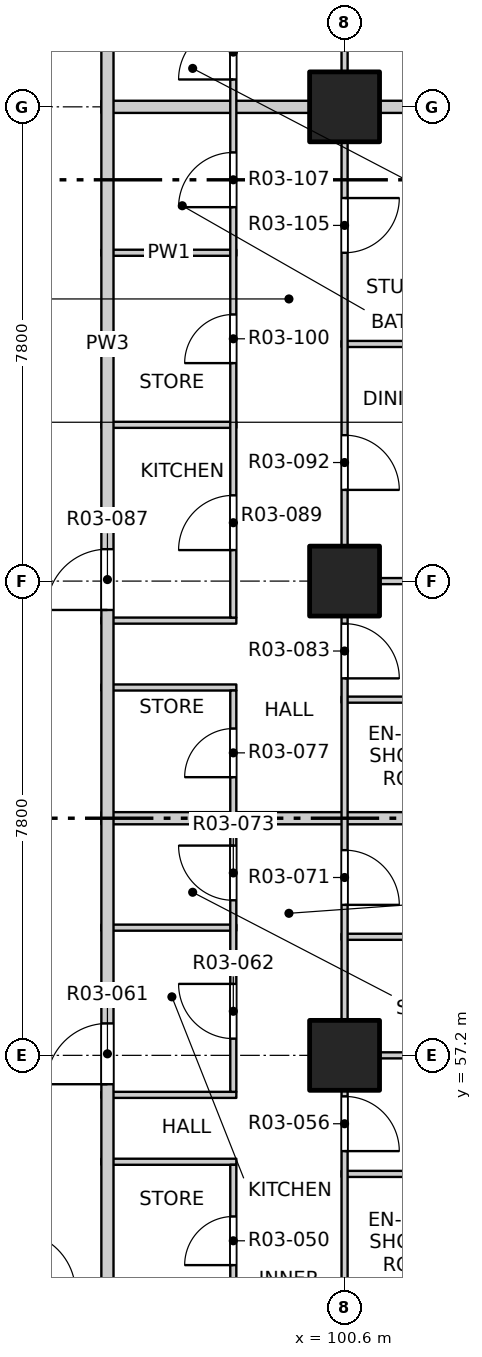
"""IFC4 building model, lengths in metres.
Left out: names, types, materials, properties, quantities, classifications, styles, units other than length and angle.
Written with IfcOpenShell. Run it as: python <this file> out.ifc"""

import sys

from ifc_helpers import new_model, si_unit, direction, frame, frame_2d, origin, origin_2d, place, context, subcontext, project, spatial, rectangle, extrude, element, fill, save


model = new_model("IFC4")
c1 = context("Model", 3, precision=1e-05, world=origin(), true_north=direction((0.0, 1.0)))
c2 = subcontext(c1, "Body", "Model", "MODEL_VIEW")
j1 = project(units=[si_unit("LENGTHUNIT", "METRE"), si_unit("PLANEANGLEUNIT", "RADIAN")], contexts=[c1])
p1 = place(None, origin())
s1 = spatial("IfcSite", under=j1, at=p1, CompositionType="ELEMENT")
p2 = place(p1, origin())
s2 = spatial("IfcBuilding", under=s1, at=p2, CompositionType="ELEMENT")
p3 = place(p2, frame((0.0, 0.0, 39.9)))
s3 = spatial("IfcBuildingStorey", under=s2, at=p3, CompositionType="ELEMENT", Elevation=39.9)
for number, where, z_axis, x_axis in (
    (1, (100.6, 57.2, -0.25), (0.0, 0.0, 1.0), (1.0, 0.0, 0.0)),
    (2, (100.6, 65.0, -0.25), (0.0, 0.0, 1.0), (1.0, 0.0, 0.0)),
    (3, (100.6, 72.8, -0.25), (0.0, 0.0, 1.0), (1.0, 0.0, 0.0)),
):
    element("IfcColumn", number, at=place(p3, frame(where, z_axis=z_axis, x_axis=x_axis)), inside=s3, PredefinedType="COLUMN", context=c2, shape_type="SweptSolid", body=[
        extrude(rectangle(XDim=1.15, YDim=1.15, at=origin_2d()), origin(), (0.0, 0.0, 1.0), 3.4),
    ])
p4 = place(p3, frame((100.55, 55.25, 0.0), z_axis=(0.0, 0.0, 1.0), x_axis=(1.0, 0.0, 0.0)))
e4 = element("IfcWall", 4, at=p4, inside=s3, PredefinedType="PARTITIONING", context=c2, shape_type="SweptSolid", body=[
    extrude(rectangle(XDim=3.55, YDim=0.1, at=frame_2d((1.775, 0.0))), origin(), (0.0, 0.0, 1.0), 3.15),
])
for number, where, z_axis, x_axis in (
    (5, (96.6, 55.45, 0.0), (0.0, 0.0, 1.0), (1.0, 0.0, 0.0)),
    (6, (96.6, 56.55, 0.0), (0.0, 0.0, 1.0), (1.0, 0.0, 0.0)),
):
    element("IfcWall", number, at=place(p3, frame(where, z_axis=z_axis, x_axis=x_axis)), inside=s3, PredefinedType="PARTITIONING", context=c2, shape_type="SweptSolid", body=[
        extrude(rectangle(XDim=2.22, YDim=0.1, at=frame_2d((1.11, 0.0))), origin(), (0.0, 0.0, 1.0), 3.15),
    ])
p5 = place(p3, frame((100.55, 57.2, 0.0), z_axis=(0.0, 0.0, 1.0), x_axis=(1.0, 0.0, 0.0)))
e7 = element("IfcWall", 7, at=p5, inside=s3, PredefinedType="PARTITIONING", context=c2, shape_type="SweptSolid", body=[
    extrude(rectangle(XDim=7.55, YDim=0.1, at=frame_2d((3.775, 0.0))), origin(), (0.0, 0.0, 1.0), 2.55),
])
p6 = place(p3, frame((100.55, 59.15, 0.0), z_axis=(0.0, 0.0, 1.0), x_axis=(1.0, 0.0, 0.0)))
e8 = element("IfcWall", 8, at=p6, inside=s3, PredefinedType="PARTITIONING", context=c2, shape_type="SweptSolid", body=[
    extrude(rectangle(XDim=3.55, YDim=0.1, at=frame_2d((1.775, 0.0))), origin(), (0.0, 0.0, 1.0), 3.15),
])
p7 = place(p3, frame((96.6, 59.3, 0.0), z_axis=(0.0, 0.0, 1.0), x_axis=(1.0, 0.0, 0.0)))
e9 = element("IfcWall", 9, at=p7, inside=s3, PredefinedType="PARTITIONING", context=c2, shape_type="SweptSolid", body=[
    extrude(rectangle(XDim=2.22, YDim=0.1, at=frame_2d((1.11, 0.0))), origin(), (0.0, 0.0, 1.0), 3.15),
])
p8 = place(p3, frame((96.6, 61.1, 0.0), z_axis=(0.0, 0.0, 1.0), x_axis=(1.0, 0.0, 0.0)))
e10 = element("IfcWall", 10, at=p8, inside=s3, PredefinedType="PARTITIONING", context=c2, shape_type="SweptSolid", body=[
    extrude(rectangle(XDim=11.5, YDim=0.2, at=frame_2d((5.75, 0.0))), origin(), (0.0, 0.0, 1.0), 3.15),
])
p9 = place(p3, frame((100.55, 63.05, 0.0), z_axis=(0.0, 0.0, 1.0), x_axis=(1.0, 0.0, 0.0)))
e11 = element("IfcWall", 11, at=p9, inside=s3, PredefinedType="PARTITIONING", context=c2, shape_type="SweptSolid", body=[
    extrude(rectangle(XDim=3.55, YDim=0.1, at=frame_2d((1.775, 0.0))), origin(), (0.0, 0.0, 1.0), 3.15),
])
for number, where, z_axis, x_axis in (
    (12, (96.6, 63.25, 0.0), (0.0, 0.0, 1.0), (1.0, 0.0, 0.0)),
    (13, (96.6, 64.35, 0.0), (0.0, 0.0, 1.0), (1.0, 0.0, 0.0)),
):
    element("IfcWall", number, at=place(p3, frame(where, z_axis=z_axis, x_axis=x_axis)), inside=s3, PredefinedType="PARTITIONING", context=c2, shape_type="SweptSolid", body=[
        extrude(rectangle(XDim=2.22, YDim=0.1, at=frame_2d((1.11, 0.0))), origin(), (0.0, 0.0, 1.0), 3.15),
    ])
p10 = place(p3, frame((100.55, 65.0, 0.0), z_axis=(0.0, 0.0, 1.0), x_axis=(1.0, 0.0, 0.0)))
e14 = element("IfcWall", 14, at=p10, inside=s3, PredefinedType="PARTITIONING", context=c2, shape_type="SweptSolid", body=[
    extrude(rectangle(XDim=7.55, YDim=0.1, at=frame_2d((3.775, 0.0))), origin(), (0.0, 0.0, 1.0), 2.55),
])
p11 = place(p3, frame((96.6, 67.57, 0.0), z_axis=(0.0, 0.0, 1.0), x_axis=(1.0, 0.0, 0.0)))
e15 = element("IfcWall", 15, at=p11, inside=s3, PredefinedType="PARTITIONING", context=c2, shape_type="SweptSolid", body=[
    extrude(rectangle(XDim=2.22, YDim=0.1, at=frame_2d((1.11, 0.0))), origin(), (0.0, 0.0, 1.0), 3.15),
])
p12 = place(p3, frame((100.55, 68.9, 0.0), z_axis=(0.0, 0.0, 1.0), x_axis=(1.0, 0.0, 0.0)))
e16 = element("IfcWall", 16, at=p12, inside=s3, PredefinedType="PARTITIONING", context=c2, shape_type="SweptSolid", body=[
    extrude(rectangle(XDim=7.55, YDim=0.1, at=frame_2d((3.775, 0.0))), origin(), (0.0, 0.0, 1.0), 3.15),
])
p13 = place(p3, frame((96.6, 70.4, 0.0), z_axis=(0.0, 0.0, 1.0), x_axis=(1.0, 0.0, 0.0)))
e17 = element("IfcWall", 17, at=p13, inside=s3, PredefinedType="PARTITIONING", context=c2, shape_type="SweptSolid", body=[
    extrude(rectangle(XDim=2.22, YDim=0.1, at=frame_2d((1.11, 0.0))), origin(), (0.0, 0.0, 1.0), 3.15),
])
p14 = place(p3, frame((96.6, 72.8, 0.0), z_axis=(0.0, 0.0, 1.0), x_axis=(1.0, 0.0, 0.0)))
e18 = element("IfcWall", 18, at=p14, inside=s3, PredefinedType="PARTITIONING", context=c2, shape_type="SweptSolid", body=[
    extrude(rectangle(XDim=4.0, YDim=0.2, at=frame_2d((2.0, 0.0))), origin(), (0.0, 0.0, 1.0), 3.15),
])
p15 = place(p3, frame((100.6, 72.8, 0.0), z_axis=(0.0, 0.0, 1.0), x_axis=(1.0, 0.0, 0.0)))
e19 = element("IfcWall", 19, at=p15, inside=s3, PredefinedType="PARTITIONING", context=c2, shape_type="SweptSolid", body=[
    extrude(rectangle(XDim=7.5, YDim=0.2, at=frame_2d((3.75, 0.0))), origin(), (0.0, 0.0, 1.0), 2.55),
])
p16 = place(p3, frame((96.7, 53.4, 0.0), z_axis=(0.0, 0.0, 1.0), x_axis=(0.0, 1.0, 0.0)))
e20 = element("IfcWall", 20, at=p16, inside=s3, PredefinedType="PARTITIONING", context=c2, shape_type="SweptSolid", body=[
    extrude(rectangle(XDim=31.0, YDim=0.2, at=frame_2d((15.5, 0.0))), origin(), (0.0, 0.0, 1.0), 3.15),
])
p17 = place(p16, frame((3.325, 0.0, 0.0)))
e21 = element("IfcOpeningElement", 21, at=p17, cuts=e20, PredefinedType="OPENING", context=c2, shape_type="SweptSolid", body=[
    extrude(rectangle(XDim=1.0, YDim=2.1, at=frame_2d((0.5, 1.05))), frame((0.0, 0.11, 0.0), z_axis=(0.0, -1.0, 0.0), x_axis=(1.0, 0.0, 0.0)), (0.0, 0.0, 1.0), 0.22),
])
p18 = place(p16, frame((11.125, 0.0, 0.0)))
e22 = element("IfcOpeningElement", 22, at=p18, cuts=e20, PredefinedType="OPENING", context=c2, shape_type="SweptSolid", body=[
    extrude(rectangle(XDim=1.0, YDim=2.1, at=frame_2d((0.5, 1.05))), frame((0.0, 0.11, 0.0), z_axis=(0.0, -1.0, 0.0), x_axis=(1.0, 0.0, 0.0)), (0.0, 0.0, 1.0), 0.22),
])
p19 = place(p16, frame((26.875, 0.0, 0.0)))
e23 = element("IfcOpeningElement", 23, at=p19, cuts=e20, PredefinedType="OPENING", context=c2, shape_type="SweptSolid", body=[
    extrude(rectangle(XDim=1.0, YDim=2.1, at=frame_2d((0.5, 1.05))), frame((0.0, 0.11, 0.0), z_axis=(0.0, -1.0, 0.0), x_axis=(1.0, 0.0, 0.0)), (0.0, 0.0, 1.0), 0.22),
])
p20 = place(p3, frame((98.77, 45.55, 0.0), z_axis=(0.0, 0.0, 1.0), x_axis=(0.0, 1.0, 0.0)))
e24 = element("IfcWall", 24, at=p20, inside=s3, PredefinedType="PARTITIONING", context=c2, shape_type="SweptSolid", body=[
    extrude(rectangle(XDim=9.85, YDim=0.1, at=frame_2d((4.925, 0.0))), origin(), (0.0, 0.0, 1.0), 3.15),
])
p21 = place(p20, frame((0.85, 0.0, 0.0)))
e25 = element("IfcOpeningElement", 25, at=p21, cuts=e24, PredefinedType="OPENING", context=c2, shape_type="SweptSolid", body=[
    extrude(rectangle(XDim=0.8, YDim=2.1, at=frame_2d((0.4, 1.05))), frame((0.0, 0.06, 0.0), z_axis=(0.0, -1.0, 0.0), x_axis=(1.0, 0.0, 0.0)), (0.0, 0.0, 1.0), 0.12),
])
p22 = place(p20, frame((3.3, 0.0, 0.0)))
e26 = element("IfcOpeningElement", 26, at=p22, cuts=e24, PredefinedType="OPENING", context=c2, shape_type="SweptSolid", body=[
    extrude(rectangle(XDim=0.9, YDim=2.1, at=frame_2d((0.45, 1.05))), frame((0.0, 0.06, 0.0), z_axis=(0.0, -1.0, 0.0), x_axis=(1.0, 0.0, 0.0)), (0.0, 0.0, 1.0), 0.12),
])
p23 = place(p20, frame((5.725, 0.0, 0.0)))
e27 = element("IfcOpeningElement", 27, at=p23, cuts=e24, PredefinedType="OPENING", context=c2, shape_type="SweptSolid", body=[
    extrude(rectangle(XDim=0.8, YDim=2.1, at=frame_2d((0.4, 1.05))), frame((0.0, 0.06, 0.0), z_axis=(0.0, -1.0, 0.0), x_axis=(1.0, 0.0, 0.0)), (0.0, 0.0, 1.0), 0.12),
])
p24 = place(p20, frame((8.2, 0.0, 0.0)))
e28 = element("IfcOpeningElement", 28, at=p24, cuts=e24, PredefinedType="OPENING", context=c2, shape_type="SweptSolid", body=[
    extrude(rectangle(XDim=0.8, YDim=2.1, at=frame_2d((0.4, 1.05))), frame((0.0, 0.06, 0.0), z_axis=(0.0, -1.0, 0.0), x_axis=(1.0, 0.0, 0.0)), (0.0, 0.0, 1.0), 0.12),
])
p25 = place(p3, frame((98.77, 56.6, 0.0), z_axis=(0.0, 0.0, 1.0), x_axis=(0.0, 1.0, 0.0)))
e29 = element("IfcWall", 29, at=p25, inside=s3, PredefinedType="PARTITIONING", context=c2, shape_type="SweptSolid", body=[
    extrude(rectangle(XDim=6.6, YDim=0.1, at=frame_2d((3.3, 0.0))), origin(), (0.0, 0.0, 1.0), 3.15),
])
p26 = place(p25, frame((0.875, 0.0, 0.0)))
e30 = element("IfcOpeningElement", 30, at=p26, cuts=e29, PredefinedType="OPENING", context=c2, shape_type="SweptSolid", body=[
    extrude(rectangle(XDim=0.9, YDim=2.1, at=frame_2d((0.45, 1.05))), frame((0.0, 0.06, 0.0), z_axis=(0.0, -1.0, 0.0), x_axis=(1.0, 0.0, 0.0)), (0.0, 0.0, 1.0), 0.12),
])
p27 = place(p25, frame((3.15, 0.0, 0.0)))
e31 = element("IfcOpeningElement", 31, at=p27, cuts=e29, PredefinedType="OPENING", context=c2, shape_type="SweptSolid", body=[
    extrude(rectangle(XDim=0.9, YDim=2.1, at=frame_2d((0.45, 1.05))), frame((0.0, 0.06, 0.0), z_axis=(0.0, -1.0, 0.0), x_axis=(1.0, 0.0, 0.0)), (0.0, 0.0, 1.0), 0.12),
])
p28 = place(p25, frame((5.175, 0.0, 0.0)))
e32 = element("IfcOpeningElement", 32, at=p28, cuts=e29, PredefinedType="OPENING", context=c2, shape_type="SweptSolid", body=[
    extrude(rectangle(XDim=0.8, YDim=2.1, at=frame_2d((0.4, 1.05))), frame((0.0, 0.06, 0.0), z_axis=(0.0, -1.0, 0.0), x_axis=(1.0, 0.0, 0.0)), (0.0, 0.0, 1.0), 0.12),
])
p29 = place(p3, frame((98.77, 64.4, 0.0), z_axis=(0.0, 0.0, 1.0), x_axis=(0.0, 1.0, 0.0)))
e33 = element("IfcWall", 33, at=p29, inside=s3, PredefinedType="PARTITIONING", context=c2, shape_type="SweptSolid", body=[
    extrude(rectangle(XDim=14.55, YDim=0.1, at=frame_2d((7.275, 0.0))), origin(), (0.0, 0.0, 1.0), 3.15),
])
p30 = place(p29, frame((1.11, 0.0, 0.0)))
e34 = element("IfcOpeningElement", 34, at=p30, cuts=e33, PredefinedType="OPENING", context=c2, shape_type="SweptSolid", body=[
    extrude(rectangle(XDim=0.9, YDim=2.1, at=frame_2d((0.45, 1.05))), frame((0.0, 0.06, 0.0), z_axis=(0.0, -1.0, 0.0), x_axis=(1.0, 0.0, 0.0)), (0.0, 0.0, 1.0), 0.12),
])
p31 = place(p29, frame((4.185, 0.0, 0.0)))
e35 = element("IfcOpeningElement", 35, at=p31, cuts=e33, PredefinedType="OPENING", context=c2, shape_type="SweptSolid", body=[
    extrude(rectangle(XDim=0.8, YDim=2.1, at=frame_2d((0.4, 1.05))), frame((0.0, 0.06, 0.0), z_axis=(0.0, -1.0, 0.0), x_axis=(1.0, 0.0, 0.0)), (0.0, 0.0, 1.0), 0.12),
])
p32 = place(p29, frame((6.75, 0.0, 0.0)))
e36 = element("IfcOpeningElement", 36, at=p32, cuts=e33, PredefinedType="OPENING", context=c2, shape_type="SweptSolid", body=[
    extrude(rectangle(XDim=0.9, YDim=2.1, at=frame_2d((0.45, 1.05))), frame((0.0, 0.06, 0.0), z_axis=(0.0, -1.0, 0.0), x_axis=(1.0, 0.0, 0.0)), (0.0, 0.0, 1.0), 0.12),
])
p33 = place(p29, frame((8.85, 0.0, 0.0)))
e37 = element("IfcOpeningElement", 37, at=p33, cuts=e33, PredefinedType="OPENING", context=c2, shape_type="SweptSolid", body=[
    extrude(rectangle(XDim=0.9, YDim=2.1, at=frame_2d((0.45, 1.05))), frame((0.0, 0.06, 0.0), z_axis=(0.0, -1.0, 0.0), x_axis=(1.0, 0.0, 0.0)), (0.0, 0.0, 1.0), 0.12),
])
p34 = place(p29, frame((10.875, 0.0, 0.0)))
e38 = element("IfcOpeningElement", 38, at=p34, cuts=e33, PredefinedType="OPENING", context=c2, shape_type="SweptSolid", body=[
    extrude(rectangle(XDim=0.9, YDim=2.1, at=frame_2d((0.45, 1.05))), frame((0.0, 0.06, 0.0), z_axis=(0.0, -1.0, 0.0), x_axis=(1.0, 0.0, 0.0)), (0.0, 0.0, 1.0), 0.12),
])
p35 = place(p29, frame((13.125, 0.0, 0.0)))
e39 = element("IfcOpeningElement", 39, at=p35, cuts=e33, PredefinedType="OPENING", context=c2, shape_type="SweptSolid", body=[
    extrude(rectangle(XDim=0.8, YDim=2.1, at=frame_2d((0.4, 1.05))), frame((0.0, 0.06, 0.0), z_axis=(0.0, -1.0, 0.0), x_axis=(1.0, 0.0, 0.0)), (0.0, 0.0, 1.0), 0.12),
])
p36 = place(p3, frame((100.6, 49.4, 0.0), z_axis=(0.0, 0.0, 1.0), x_axis=(0.0, 1.0, 0.0)))
e40 = element("IfcWall", 40, at=p36, inside=s3, PredefinedType="PARTITIONING", context=c2, shape_type="SweptSolid", body=[
    extrude(rectangle(XDim=31.2, YDim=0.1, at=frame_2d((15.6, 0.0))), origin(), (0.0, 0.0, 1.0), 3.15),
])
p37 = place(p36, frame((1.5, 0.0, 0.0)))
e41 = element("IfcOpeningElement", 41, at=p37, cuts=e40, PredefinedType="OPENING", context=c2, shape_type="SweptSolid", body=[
    extrude(rectangle(XDim=0.9, YDim=2.1, at=frame_2d((0.45, 1.05))), frame((0.0, 0.06, 0.0), z_axis=(0.0, -1.0, 0.0), x_axis=(1.0, 0.0, 0.0)), (0.0, 0.0, 1.0), 0.12),
])
p38 = place(p36, frame((6.225, 0.0, 0.0)))
e42 = element("IfcOpeningElement", 42, at=p38, cuts=e40, PredefinedType="OPENING", context=c2, shape_type="SweptSolid", body=[
    extrude(rectangle(XDim=0.9, YDim=2.1, at=frame_2d((0.45, 1.05))), frame((0.0, 0.06, 0.0), z_axis=(0.0, -1.0, 0.0), x_axis=(1.0, 0.0, 0.0)), (0.0, 0.0, 1.0), 0.12),
])
p39 = place(p36, frame((10.275, 0.0, 0.0)))
e43 = element("IfcOpeningElement", 43, at=p39, cuts=e40, PredefinedType="OPENING", context=c2, shape_type="SweptSolid", body=[
    extrude(rectangle(XDim=0.9, YDim=2.1, at=frame_2d((0.45, 1.05))), frame((0.0, 0.06, 0.0), z_axis=(0.0, -1.0, 0.0), x_axis=(1.0, 0.0, 0.0)), (0.0, 0.0, 1.0), 0.12),
])
p40 = place(p36, frame((14.0, 0.0, 0.0)))
e44 = element("IfcOpeningElement", 44, at=p40, cuts=e40, PredefinedType="OPENING", context=c2, shape_type="SweptSolid", body=[
    extrude(rectangle(XDim=0.9, YDim=2.1, at=frame_2d((0.45, 1.05))), frame((0.0, 0.06, 0.0), z_axis=(0.0, -1.0, 0.0), x_axis=(1.0, 0.0, 0.0)), (0.0, 0.0, 1.0), 0.12),
])
p41 = place(p36, frame((17.1, 0.0, 0.0)))
e45 = element("IfcOpeningElement", 45, at=p41, cuts=e40, PredefinedType="OPENING", context=c2, shape_type="SweptSolid", body=[
    extrude(rectangle(XDim=0.9, YDim=2.1, at=frame_2d((0.45, 1.05))), frame((0.0, 0.06, 0.0), z_axis=(0.0, -1.0, 0.0), x_axis=(1.0, 0.0, 0.0)), (0.0, 0.0, 1.0), 0.12),
])
p42 = place(p36, frame((21.0, 0.0, 0.0)))
e46 = element("IfcOpeningElement", 46, at=p42, cuts=e40, PredefinedType="OPENING", context=c2, shape_type="SweptSolid", body=[
    extrude(rectangle(XDim=0.9, YDim=2.1, at=frame_2d((0.45, 1.05))), frame((0.0, 0.06, 0.0), z_axis=(0.0, -1.0, 0.0), x_axis=(1.0, 0.0, 0.0)), (0.0, 0.0, 1.0), 0.12),
])
p43 = place(p36, frame((25.875, 0.0, 0.0)))
e47 = element("IfcOpeningElement", 47, at=p43, cuts=e40, PredefinedType="OPENING", context=c2, shape_type="SweptSolid", body=[
    extrude(rectangle(XDim=0.9, YDim=2.1, at=frame_2d((0.45, 1.05))), frame((0.0, 0.06, 0.0), z_axis=(0.0, -1.0, 0.0), x_axis=(1.0, 0.0, 0.0)), (0.0, 0.0, 1.0), 0.12),
])
p44 = place(p36, frame((29.6, 0.0, 0.0)))
e48 = element("IfcOpeningElement", 48, at=p44, cuts=e40, PredefinedType="OPENING", context=c2, shape_type="SweptSolid", body=[
    extrude(rectangle(XDim=0.9, YDim=2.1, at=frame_2d((0.45, 1.05))), frame((0.0, 0.06, 0.0), z_axis=(0.0, -1.0, 0.0), x_axis=(1.0, 0.0, 0.0)), (0.0, 0.0, 1.0), 0.12),
])
p45 = place(p24, origin())
e49 = element("IfcDoor", 49, at=p45, inside=s3, OperationType="SINGLE_SWING_LEFT", PredefinedType="DOOR", context=c2, shape_type="SweptSolid", body=[
    extrude(rectangle(XDim=0.8, YDim=2.1, at=frame_2d((0.4, 1.05))), frame((0.0, 0.025, 0.0), z_axis=(0.0, -1.0, 0.0), x_axis=(1.0, 0.0, 0.0)), (0.0, 0.0, 1.0), 0.05),
])
fill(e28, e49)
p46 = place(p38, origin())
e50 = element("IfcDoor", 50, at=p46, inside=s3, OperationType="SINGLE_SWING_RIGHT", PredefinedType="DOOR", context=c2, shape_type="SweptSolid", body=[
    extrude(rectangle(XDim=0.9, YDim=2.1, at=frame_2d((0.45, 1.05))), frame((0.0, 0.025, 0.0), z_axis=(0.0, -1.0, 0.0), x_axis=(1.0, 0.0, 0.0)), (0.0, 0.0, 1.0), 0.05),
])
fill(e42, e50)
p47 = place(p17, origin())
e51 = element("IfcDoor", 51, at=p47, inside=s3, OperationType="SINGLE_SWING_LEFT", PredefinedType="DOOR", context=c2, shape_type="SweptSolid", body=[
    extrude(rectangle(XDim=1.0, YDim=2.1, at=frame_2d((0.5, 1.05))), frame((0.0, 0.025, 0.0), z_axis=(0.0, -1.0, 0.0), x_axis=(1.0, 0.0, 0.0)), (0.0, 0.0, 1.0), 0.05),
])
fill(e21, e51)
p48 = place(p26, origin())
e52 = element("IfcDoor", 52, at=p48, inside=s3, OperationType="SINGLE_SWING_RIGHT", PredefinedType="DOOR", context=c2, shape_type="SweptSolid", body=[
    extrude(rectangle(XDim=0.9, YDim=2.1, at=frame_2d((0.45, 1.05))), frame((0.0, 0.025, 0.0), z_axis=(0.0, -1.0, 0.0), x_axis=(1.0, 0.0, 0.0)), (0.0, 0.0, 1.0), 0.05),
])
fill(e30, e52)
p49 = place(p39, origin())
e53 = element("IfcDoor", 53, at=p49, inside=s3, OperationType="SINGLE_SWING_RIGHT", PredefinedType="DOOR", context=c2, shape_type="SweptSolid", body=[
    extrude(rectangle(XDim=0.9, YDim=2.1, at=frame_2d((0.45, 1.05))), frame((0.0, 0.025, 0.0), z_axis=(0.0, -1.0, 0.0), x_axis=(1.0, 0.0, 0.0)), (0.0, 0.0, 1.0), 0.05),
])
fill(e43, e53)
p50 = place(p27, origin())
e54 = element("IfcDoor", 54, at=p50, inside=s3, OperationType="SINGLE_SWING_RIGHT", PredefinedType="DOOR", context=c2, shape_type="SweptSolid", body=[
    extrude(rectangle(XDim=0.9, YDim=2.1, at=frame_2d((0.45, 1.05))), frame((0.0, 0.025, 0.0), z_axis=(0.0, -1.0, 0.0), x_axis=(1.0, 0.0, 0.0)), (0.0, 0.0, 1.0), 0.05),
])
fill(e31, e54)
p51 = place(p28, origin())
e55 = element("IfcDoor", 55, at=p51, inside=s3, OperationType="SINGLE_SWING_LEFT", PredefinedType="DOOR", context=c2, shape_type="SweptSolid", body=[
    extrude(rectangle(XDim=0.8, YDim=2.1, at=frame_2d((0.4, 1.05))), frame((0.0, 0.025, 0.0), z_axis=(0.0, -1.0, 0.0), x_axis=(1.0, 0.0, 0.0)), (0.0, 0.0, 1.0), 0.05),
])
fill(e32, e55)
p52 = place(p40, origin())
e56 = element("IfcDoor", 56, at=p52, inside=s3, OperationType="SINGLE_SWING_RIGHT", PredefinedType="DOOR", context=c2, shape_type="SweptSolid", body=[
    extrude(rectangle(XDim=0.9, YDim=2.1, at=frame_2d((0.45, 1.05))), frame((0.0, 0.025, 0.0), z_axis=(0.0, -1.0, 0.0), x_axis=(1.0, 0.0, 0.0)), (0.0, 0.0, 1.0), 0.05),
])
fill(e44, e56)
p53 = place(p18, origin())
e57 = element("IfcDoor", 57, at=p53, inside=s3, OperationType="SINGLE_SWING_LEFT", PredefinedType="DOOR", context=c2, shape_type="SweptSolid", body=[
    extrude(rectangle(XDim=1.0, YDim=2.1, at=frame_2d((0.5, 1.05))), frame((0.0, 0.025, 0.0), z_axis=(0.0, -1.0, 0.0), x_axis=(1.0, 0.0, 0.0)), (0.0, 0.0, 1.0), 0.05),
])
fill(e22, e57)
p54 = place(p30, origin())
e58 = element("IfcDoor", 58, at=p54, inside=s3, OperationType="SINGLE_SWING_LEFT", PredefinedType="DOOR", context=c2, shape_type="SweptSolid", body=[
    extrude(rectangle(XDim=0.9, YDim=2.1, at=frame_2d((0.45, 1.05))), frame((0.0, 0.025, 0.0), z_axis=(0.0, -1.0, 0.0), x_axis=(1.0, 0.0, 0.0)), (0.0, 0.0, 1.0), 0.05),
])
fill(e34, e58)
p55 = place(p41, origin())
e59 = element("IfcDoor", 59, at=p55, inside=s3, OperationType="SINGLE_SWING_RIGHT", PredefinedType="DOOR", context=c2, shape_type="SweptSolid", body=[
    extrude(rectangle(XDim=0.9, YDim=2.1, at=frame_2d((0.45, 1.05))), frame((0.0, 0.025, 0.0), z_axis=(0.0, -1.0, 0.0), x_axis=(1.0, 0.0, 0.0)), (0.0, 0.0, 1.0), 0.05),
])
fill(e45, e59)
p56 = place(p31, origin())
e60 = element("IfcDoor", 60, at=p56, inside=s3, OperationType="SINGLE_SWING_LEFT", PredefinedType="DOOR", context=c2, shape_type="SweptSolid", body=[
    extrude(rectangle(XDim=0.8, YDim=2.1, at=frame_2d((0.4, 1.05))), frame((0.0, 0.025, 0.0), z_axis=(0.0, -1.0, 0.0), x_axis=(1.0, 0.0, 0.0)), (0.0, 0.0, 1.0), 0.05),
])
fill(e35, e60)
p57 = place(p42, origin())
e61 = element("IfcDoor", 61, at=p57, inside=s3, OperationType="SINGLE_SWING_LEFT", PredefinedType="DOOR", context=c2, shape_type="SweptSolid", body=[
    extrude(rectangle(XDim=0.9, YDim=2.1, at=frame_2d((0.45, 1.05))), frame((0.0, 0.025, 0.0), z_axis=(0.0, -1.0, 0.0), x_axis=(1.0, 0.0, 0.0)), (0.0, 0.0, 1.0), 0.05),
])
fill(e46, e61)
p58 = place(p32, origin())
e62 = element("IfcDoor", 62, at=p58, inside=s3, OperationType="SINGLE_SWING_LEFT", PredefinedType="DOOR", context=c2, shape_type="SweptSolid", body=[
    extrude(rectangle(XDim=0.9, YDim=2.1, at=frame_2d((0.45, 1.05))), frame((0.0, 0.025, 0.0), z_axis=(0.0, -1.0, 0.0), x_axis=(1.0, 0.0, 0.0)), (0.0, 0.0, 1.0), 0.05),
])
fill(e36, e62)
p59 = place(p33, origin())
e63 = element("IfcDoor", 63, at=p59, inside=s3, OperationType="SINGLE_SWING_LEFT", PredefinedType="DOOR", context=c2, shape_type="SweptSolid", body=[
    extrude(rectangle(XDim=0.9, YDim=2.1, at=frame_2d((0.45, 1.05))), frame((0.0, 0.025, 0.0), z_axis=(0.0, -1.0, 0.0), x_axis=(1.0, 0.0, 0.0)), (0.0, 0.0, 1.0), 0.05),
])
fill(e37, e63)
save(model, sys.argv[1])
